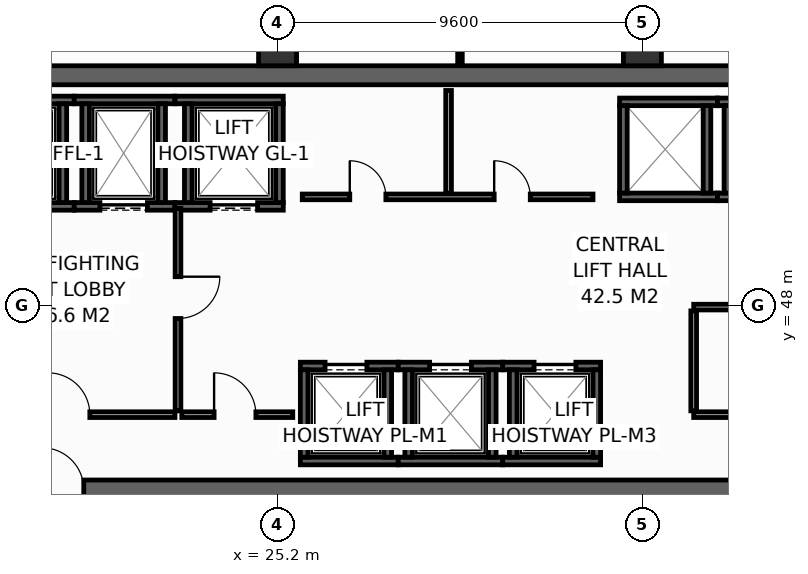
"""IFC4 building model, lengths in metres.
Left out: names, types, materials, properties, quantities, classifications, styles, units other than length and angle.
Written with IfcOpenShell. Run it as: python <this file> out.ifc"""

import sys

from ifc_helpers import new_model, si_unit, direction, frame, frame_2d, origin, origin_2d, place, context, subcontext, project, spatial, rectangle, hollow_rectangle, extrude, element, fill, save


model = new_model("IFC4")
c1 = context("Model", 3, precision=1e-05, world=origin(), true_north=direction((0.0, 1.0)))
c2 = subcontext(c1, "Body", "Model", "MODEL_VIEW")
j1 = project(units=[si_unit("LENGTHUNIT", "METRE"), si_unit("PLANEANGLEUNIT", "RADIAN")], contexts=[c1])
p1 = place(None, origin())
s1 = spatial("IfcSite", under=j1, at=p1, CompositionType="ELEMENT")
p2 = place(p1, origin())
s2 = spatial("IfcBuilding", under=s1, at=p2, CompositionType="ELEMENT")
p3 = place(p2, frame((0.0, 0.0, 137.2)))
s3 = spatial("IfcBuildingStorey", under=s2, at=p3, CompositionType="ELEMENT", Elevation=137.2)
p4 = place(p3, frame((13.6, 43.15, 0.0), z_axis=(0.0, 0.0, 1.0), x_axis=(1.0, 0.0, 0.0)))
e1 = element("IfcWall", 1, at=p4, inside=s3, PredefinedType="SHEAR", context=c2, shape_type="SweptSolid", body=[
    extrude(rectangle(XDim=32.7, YDim=0.5, at=frame_2d((16.35, 0.0))), origin(), (0.0, 0.0, 1.0), 3.55),
])
p5 = place(p4, frame((5.4, 0.0, 0.0)))
e2 = element("IfcOpeningElement", 2, at=p5, cuts=e1, PredefinedType="OPENING", context=c2, shape_type="SweptSolid", body=[
    extrude(rectangle(XDim=1.1, YDim=2.15, at=frame_2d((0.55, 1.075))), frame((0.0, 0.26, 0.0), z_axis=(0.0, -1.0, 0.0), x_axis=(1.0, 0.0, 0.0)), (0.0, 0.0, 1.0), 0.52),
])
p6 = place(p4, frame((25.6, 0.0, 0.0)))
e3 = element("IfcOpeningElement", 3, at=p6, cuts=e1, PredefinedType="OPENING", context=c2, shape_type="SweptSolid", body=[
    extrude(rectangle(XDim=1.1, YDim=2.15, at=frame_2d((0.55, 1.075))), frame((0.0, 0.26, 0.0), z_axis=(0.0, -1.0, 0.0), x_axis=(1.0, 0.0, 0.0)), (0.0, 0.0, 1.0), 0.52),
])
p7 = place(p3, frame((13.6, 54.05, 0.0), z_axis=(0.0, 0.0, 1.0), x_axis=(1.0, 0.0, 0.0)))
e4 = element("IfcWall", 4, at=p7, inside=s3, PredefinedType="SHEAR", context=c2, shape_type="SweptSolid", body=[
    extrude(rectangle(XDim=32.7, YDim=0.5, at=frame_2d((16.35, 0.0))), origin(), (0.0, 0.0, 1.0), 3.55),
])
for number, where, z_axis, x_axis in (
    (5, (25.2, 54.8, 0.0), (0.0, 0.0, 1.0), (1.0, 0.0, 0.0)),
    (6, (34.8, 54.8, 0.0), (0.0, 0.0, 1.0), (1.0, 0.0, 0.0)),
):
    element("IfcColumn", number, at=place(p3, frame(where, z_axis=z_axis, x_axis=x_axis)), inside=s3, PredefinedType="COLUMN", context=c2, shape_type="SweptSolid", body=[
        extrude(hollow_rectangle(XDim=1.0, YDim=1.0, WallThickness=0.045, at=origin_2d()), origin(), (0.0, 0.0, 1.0), 3.8),
    ])
p8 = place(p3, frame((17.33, 50.6, 0.0), z_axis=(0.0, 0.0, 1.0), x_axis=(1.0, 0.0, 0.0)))
e7 = element("IfcWall", 7, at=p8, inside=s3, PredefinedType="SHEAR", context=c2, shape_type="SweptSolid", body=[
    extrude(rectangle(XDim=2.52, YDim=0.2, at=frame_2d((1.26, 0.0))), origin(), (0.0, 0.0, 1.0), 3.55),
])
p9 = place(p8, frame((0.595, 0.0, 0.0)))
e8 = element("IfcOpeningElement", 8, at=p9, cuts=e7, PredefinedType="OPENING", context=c2, shape_type="SweptSolid", body=[
    extrude(rectangle(XDim=1.25, YDim=2.3, at=frame_2d((0.625, 1.15))), frame((0.0, 0.11, 0.0), z_axis=(0.0, -1.0, 0.0), x_axis=(1.0, 0.0, 0.0)), (0.0, 0.0, 1.0), 0.22),
])
p10 = place(p3, frame((17.33, 53.4, 0.0), z_axis=(0.0, 0.0, 1.0), x_axis=(1.0, 0.0, 0.0)))
e9 = element("IfcWall", 9, at=p10, inside=s3, PredefinedType="SHEAR", context=c2, shape_type="SweptSolid", body=[
    extrude(rectangle(XDim=2.52, YDim=0.2, at=frame_2d((1.26, 0.0))), origin(), (0.0, 0.0, 1.0), 3.55),
])
p11 = place(p3, frame((19.55, 50.7, 0.0), z_axis=(0.0, 0.0, 1.0), x_axis=(0.0, 1.0, 0.0)))
e10 = element("IfcWall", 10, at=p11, inside=s3, PredefinedType="SHEAR", context=c2, shape_type="SweptSolid", body=[
    extrude(rectangle(XDim=2.6, YDim=0.2, at=frame_2d((1.3, 0.0))), origin(), (0.0, 0.0, 1.0), 3.55),
])
p12 = place(p3, frame((19.85, 50.6, 0.0), z_axis=(0.0, 0.0, 1.0), x_axis=(1.0, 0.0, 0.0)))
e11 = element("IfcWall", 11, at=p12, inside=s3, PredefinedType="SHEAR", context=c2, shape_type="SweptSolid", body=[
    extrude(rectangle(XDim=2.65, YDim=0.2, at=frame_2d((1.325, 0.0))), origin(), (0.0, 0.0, 1.0), 3.55),
])
p13 = place(p12, frame((0.675, 0.0, 0.0)))
e12 = element("IfcOpeningElement", 12, at=p13, cuts=e11, PredefinedType="OPENING", context=c2, shape_type="SweptSolid", body=[
    extrude(rectangle(XDim=1.25, YDim=2.3, at=frame_2d((0.625, 1.15))), frame((0.0, 0.11, 0.0), z_axis=(0.0, -1.0, 0.0), x_axis=(1.0, 0.0, 0.0)), (0.0, 0.0, 1.0), 0.22),
])
p14 = place(p3, frame((19.85, 53.4, 0.0), z_axis=(0.0, 0.0, 1.0), x_axis=(1.0, 0.0, 0.0)))
e13 = element("IfcWall", 13, at=p14, inside=s3, PredefinedType="SHEAR", context=c2, shape_type="SweptSolid", body=[
    extrude(rectangle(XDim=2.65, YDim=0.2, at=frame_2d((1.325, 0.0))), origin(), (0.0, 0.0, 1.0), 3.55),
])
for number, where, z_axis, x_axis in (
    (14, (20.15, 50.7, 0.0), (0.0, 0.0, 1.0), (0.0, 1.0, 0.0)),
    (15, (22.15, 50.7, 0.0), (0.0, 0.0, 1.0), (0.0, 1.0, 0.0)),
):
    element("IfcWall", number, at=place(p3, frame(where, z_axis=z_axis, x_axis=x_axis)), inside=s3, PredefinedType="SHEAR", context=c2, shape_type="SweptSolid", body=[
        extrude(rectangle(XDim=2.6, YDim=0.2, at=frame_2d((1.3, 0.0))), origin(), (0.0, 0.0, 1.0), 3.55),
    ])
p15 = place(p3, frame((22.5, 50.6, 0.0), z_axis=(0.0, 0.0, 1.0), x_axis=(1.0, 0.0, 0.0)))
e16 = element("IfcWall", 16, at=p15, inside=s3, PredefinedType="SHEAR", context=c2, shape_type="SweptSolid", body=[
    extrude(rectangle(XDim=2.85, YDim=0.2, at=frame_2d((1.425, 0.0))), origin(), (0.0, 0.0, 1.0), 3.55),
])
p16 = place(p15, frame((0.925, 0.0, 0.0)))
e17 = element("IfcOpeningElement", 17, at=p16, cuts=e16, PredefinedType="OPENING", context=c2, shape_type="SweptSolid", body=[
    extrude(rectangle(XDim=1.25, YDim=2.3, at=frame_2d((0.625, 1.15))), frame((0.0, 0.11, 0.0), z_axis=(0.0, -1.0, 0.0), x_axis=(1.0, 0.0, 0.0)), (0.0, 0.0, 1.0), 0.22),
])
p17 = place(p3, frame((22.5, 53.4, 0.0), z_axis=(0.0, 0.0, 1.0), x_axis=(1.0, 0.0, 0.0)))
e18 = element("IfcWall", 18, at=p17, inside=s3, PredefinedType="SHEAR", context=c2, shape_type="SweptSolid", body=[
    extrude(rectangle(XDim=2.85, YDim=0.2, at=frame_2d((1.425, 0.0))), origin(), (0.0, 0.0, 1.0), 3.55),
])
for number, where, z_axis, x_axis in (
    (19, (22.85, 50.7, 0.0), (0.0, 0.0, 1.0), (0.0, 1.0, 0.0)),
    (20, (25.25, 50.7, 0.0), (0.0, 0.0, 1.0), (0.0, 1.0, 0.0)),
):
    element("IfcWall", number, at=place(p3, frame(where, z_axis=z_axis, x_axis=x_axis)), inside=s3, PredefinedType="SHEAR", context=c2, shape_type="SweptSolid", body=[
        extrude(rectangle(XDim=2.6, YDim=0.2, at=frame_2d((1.3, 0.0))), origin(), (0.0, 0.0, 1.0), 3.55),
    ])
p18 = place(p3, frame((25.8, 43.9, 0.0), z_axis=(0.0, 0.0, 1.0), x_axis=(1.0, 0.0, 0.0)))
e21 = element("IfcWall", 21, at=p18, inside=s3, PredefinedType="SHEAR", context=c2, shape_type="SweptSolid", body=[
    extrude(rectangle(XDim=2.575, YDim=0.2, at=frame_2d((1.288, 0.0))), origin(), (0.0, 0.0, 1.0), 3.55),
])
p19 = place(p3, frame((25.8, 46.4, 0.0), z_axis=(0.0, 0.0, 1.0), x_axis=(1.0, 0.0, 0.0)))
e22 = element("IfcWall", 22, at=p19, inside=s3, PredefinedType="SHEAR", context=c2, shape_type="SweptSolid", body=[
    extrude(rectangle(XDim=2.575, YDim=0.2, at=frame_2d((1.288, 0.0))), origin(), (0.0, 0.0, 1.0), 3.55),
])
p20 = place(p19, frame((0.65, 0.0, 0.0)))
e23 = element("IfcOpeningElement", 23, at=p20, cuts=e22, PredefinedType="OPENING", context=c2, shape_type="SweptSolid", body=[
    extrude(rectangle(XDim=1.1, YDim=2.2, at=frame_2d((0.55, 1.1))), frame((0.0, 0.11, 0.0), z_axis=(0.0, -1.0, 0.0), x_axis=(1.0, 0.0, 0.0)), (0.0, 0.0, 1.0), 0.22),
])
for number, where, z_axis, x_axis in (
    (24, (25.9, 44.0, 0.0), (0.0, 0.0, 1.0), (0.0, 1.0, 0.0)),
    (25, (28.1, 44.0, 0.0), (0.0, 0.0, 1.0), (0.0, 1.0, 0.0)),
):
    element("IfcWall", number, at=place(p3, frame(where, z_axis=z_axis, x_axis=x_axis)), inside=s3, PredefinedType="SHEAR", context=c2, shape_type="SweptSolid", body=[
        extrude(rectangle(XDim=2.3, YDim=0.2, at=frame_2d((1.15, 0.0))), origin(), (0.0, 0.0, 1.0), 3.55),
    ])
p21 = place(p3, frame((28.375, 43.9, 0.0), z_axis=(0.0, 0.0, 1.0), x_axis=(1.0, 0.0, 0.0)))
e26 = element("IfcWall", 26, at=p21, inside=s3, PredefinedType="SHEAR", context=c2, shape_type="SweptSolid", body=[
    extrude(rectangle(XDim=2.75, YDim=0.2, at=frame_2d((1.375, 0.0))), origin(), (0.0, 0.0, 1.0), 3.55),
])
p22 = place(p3, frame((28.375, 46.4, 0.0), z_axis=(0.0, 0.0, 1.0), x_axis=(1.0, 0.0, 0.0)))
e27 = element("IfcWall", 27, at=p22, inside=s3, PredefinedType="SHEAR", context=c2, shape_type="SweptSolid", body=[
    extrude(rectangle(XDim=2.75, YDim=0.2, at=frame_2d((1.375, 0.0))), origin(), (0.0, 0.0, 1.0), 3.55),
])
p23 = place(p22, frame((0.825, 0.0, 0.0)))
e28 = element("IfcOpeningElement", 28, at=p23, cuts=e27, PredefinedType="OPENING", context=c2, shape_type="SweptSolid", body=[
    extrude(rectangle(XDim=1.1, YDim=2.2, at=frame_2d((0.55, 1.1))), frame((0.0, 0.11, 0.0), z_axis=(0.0, -1.0, 0.0), x_axis=(1.0, 0.0, 0.0)), (0.0, 0.0, 1.0), 0.22),
])
for number, where, z_axis, x_axis in (
    (29, (28.65, 44.0, 0.0), (0.0, 0.0, 1.0), (0.0, 1.0, 0.0)),
    (30, (30.85, 44.0, 0.0), (0.0, 0.0, 1.0), (0.0, 1.0, 0.0)),
):
    element("IfcWall", number, at=place(p3, frame(where, z_axis=z_axis, x_axis=x_axis)), inside=s3, PredefinedType="SHEAR", context=c2, shape_type="SweptSolid", body=[
        extrude(rectangle(XDim=2.3, YDim=0.2, at=frame_2d((1.15, 0.0))), origin(), (0.0, 0.0, 1.0), 3.55),
    ])
p24 = place(p3, frame((31.125, 43.9, 0.0), z_axis=(0.0, 0.0, 1.0), x_axis=(1.0, 0.0, 0.0)))
e31 = element("IfcWall", 31, at=p24, inside=s3, PredefinedType="SHEAR", context=c2, shape_type="SweptSolid", body=[
    extrude(rectangle(XDim=2.575, YDim=0.2, at=frame_2d((1.288, 0.0))), origin(), (0.0, 0.0, 1.0), 3.55),
])
p25 = place(p3, frame((31.125, 46.4, 0.0), z_axis=(0.0, 0.0, 1.0), x_axis=(1.0, 0.0, 0.0)))
e32 = element("IfcWall", 32, at=p25, inside=s3, PredefinedType="SHEAR", context=c2, shape_type="SweptSolid", body=[
    extrude(rectangle(XDim=2.575, YDim=0.2, at=frame_2d((1.288, 0.0))), origin(), (0.0, 0.0, 1.0), 3.55),
])
p26 = place(p25, frame((0.825, 0.0, 0.0)))
e33 = element("IfcOpeningElement", 33, at=p26, cuts=e32, PredefinedType="OPENING", context=c2, shape_type="SweptSolid", body=[
    extrude(rectangle(XDim=1.1, YDim=2.2, at=frame_2d((0.55, 1.1))), frame((0.0, 0.11, 0.0), z_axis=(0.0, -1.0, 0.0), x_axis=(1.0, 0.0, 0.0)), (0.0, 0.0, 1.0), 0.22),
])
for number, where, z_axis, x_axis in (
    (34, (31.4, 44.0, 0.0), (0.0, 0.0, 1.0), (0.0, 1.0, 0.0)),
    (35, (33.6, 44.0, 0.0), (0.0, 0.0, 1.0), (0.0, 1.0, 0.0)),
):
    element("IfcWall", number, at=place(p3, frame(where, z_axis=z_axis, x_axis=x_axis)), inside=s3, PredefinedType="SHEAR", context=c2, shape_type="SweptSolid", body=[
        extrude(rectangle(XDim=2.3, YDim=0.2, at=frame_2d((1.15, 0.0))), origin(), (0.0, 0.0, 1.0), 3.55),
    ])
for number, where, z_axis, x_axis in (
    (36, (34.2, 50.85, 0.0), (0.0, 0.0, 1.0), (1.0, 0.0, 0.0)),
    (37, (34.2, 53.35, 0.0), (0.0, 0.0, 1.0), (1.0, 0.0, 0.0)),
):
    element("IfcWall", number, at=place(p3, frame(where, z_axis=z_axis, x_axis=x_axis)), inside=s3, PredefinedType="SHEAR", context=c2, shape_type="SweptSolid", body=[
        extrude(rectangle(XDim=2.575, YDim=0.2, at=frame_2d((1.288, 0.0))), origin(), (0.0, 0.0, 1.0), 3.55),
    ])
for number, where, z_axis, x_axis in (
    (38, (34.3, 50.95, 0.0), (0.0, 0.0, 1.0), (0.0, 1.0, 0.0)),
    (39, (36.5, 50.95, 0.0), (0.0, 0.0, 1.0), (0.0, 1.0, 0.0)),
):
    element("IfcWall", number, at=place(p3, frame(where, z_axis=z_axis, x_axis=x_axis)), inside=s3, PredefinedType="SHEAR", context=c2, shape_type="SweptSolid", body=[
        extrude(rectangle(XDim=2.3, YDim=0.2, at=frame_2d((1.15, 0.0))), origin(), (0.0, 0.0, 1.0), 3.55),
    ])
for number, where, z_axis, x_axis in (
    (40, (36.775, 50.85, 0.0), (0.0, 0.0, 1.0), (1.0, 0.0, 0.0)),
    (41, (36.775, 53.35, 0.0), (0.0, 0.0, 1.0), (1.0, 0.0, 0.0)),
):
    element("IfcWall", number, at=place(p3, frame(where, z_axis=z_axis, x_axis=x_axis)), inside=s3, PredefinedType="SHEAR", context=c2, shape_type="SweptSolid", body=[
        extrude(rectangle(XDim=2.75, YDim=0.2, at=frame_2d((1.375, 0.0))), origin(), (0.0, 0.0, 1.0), 3.55),
    ])
p27 = place(p3, frame((37.05, 50.95, 0.0), z_axis=(0.0, 0.0, 1.0), x_axis=(0.0, 1.0, 0.0)))
e42 = element("IfcWall", 42, at=p27, inside=s3, PredefinedType="SHEAR", context=c2, shape_type="SweptSolid", body=[
    extrude(rectangle(XDim=2.3, YDim=0.2, at=frame_2d((1.15, 0.0))), origin(), (0.0, 0.0, 1.0), 3.55),
])
p28 = place(p3, frame((17.36, 45.12, 0.0), z_axis=(0.0, 0.0, 1.0), x_axis=(1.0, 0.0, 0.0)))
e43 = element("IfcWall", 43, at=p28, inside=s3, PredefinedType="PARTITIONING", context=c2, shape_type="SweptSolid", body=[
    extrude(rectangle(XDim=5.14, YDim=0.15, at=frame_2d((2.57, 0.0))), origin(), (0.0, 0.0, 1.0), 3.55),
])
p29 = place(p28, frame((1.8, 0.0, 0.0)))
e44 = element("IfcOpeningElement", 44, at=p29, cuts=e43, PredefinedType="OPENING", context=c2, shape_type="SweptSolid", body=[
    extrude(rectangle(XDim=1.1, YDim=2.15, at=frame_2d((0.55, 1.075))), frame((0.0, 0.085, 0.0), z_axis=(0.0, -1.0, 0.0), x_axis=(1.0, 0.0, 0.0)), (0.0, 0.0, 1.0), 0.17),
])
p30 = place(p3, frame((22.58, 50.55, 0.0), z_axis=(0.0, 0.0, 1.0), x_axis=(0.0, -1.0, 0.0)))
e45 = element("IfcWall", 45, at=p30, inside=s3, PredefinedType="PARTITIONING", context=c2, shape_type="SweptSolid", body=[
    extrude(rectangle(XDim=5.33, YDim=0.15, at=frame_2d((2.665, 0.0))), origin(), (0.0, 0.0, 1.0), 3.55),
])
p31 = place(p30, frame((1.8, 0.0, 0.0)))
e46 = element("IfcOpeningElement", 46, at=p31, cuts=e45, PredefinedType="OPENING", context=c2, shape_type="SweptSolid", body=[
    extrude(rectangle(XDim=1.1, YDim=2.15, at=frame_2d((0.55, 1.075))), frame((0.0, 0.085, 0.0), z_axis=(0.0, -1.0, 0.0), x_axis=(1.0, 0.0, 0.0)), (0.0, 0.0, 1.0), 0.17),
])
p32 = place(p3, frame((22.68, 45.12, 0.0), z_axis=(0.0, 0.0, 1.0), x_axis=(1.0, 0.0, 0.0)))
e47 = element("IfcWall", 47, at=p32, inside=s3, PredefinedType="PARTITIONING", context=c2, shape_type="SweptSolid", body=[
    extrude(rectangle(XDim=2.92, YDim=0.15, at=frame_2d((1.46, 0.0))), origin(), (0.0, 0.0, 1.0), 3.55),
])
p33 = place(p32, frame((0.85, 0.0, 0.0)))
e48 = element("IfcOpeningElement", 48, at=p33, cuts=e47, PredefinedType="OPENING", context=c2, shape_type="SweptSolid", body=[
    extrude(rectangle(XDim=1.1, YDim=2.15, at=frame_2d((0.55, 1.075))), frame((0.0, 0.085, 0.0), z_axis=(0.0, -1.0, 0.0), x_axis=(1.0, 0.0, 0.0)), (0.0, 0.0, 1.0), 0.17),
])
p34 = place(p3, frame((36.15, 45.12, 0.0), z_axis=(0.0, 0.0, 1.0), x_axis=(1.0, 0.0, 0.0)))
e49 = element("IfcWall", 49, at=p34, inside=s3, PredefinedType="PARTITIONING", context=c2, shape_type="SweptSolid", body=[
    extrude(rectangle(XDim=6.35, YDim=0.15, at=frame_2d((3.175, 0.0))), origin(), (0.0, 0.0, 1.0), 3.55),
])
p35 = place(p34, frame((1.05, 0.0, 0.0)))
e50 = element("IfcOpeningElement", 50, at=p35, cuts=e49, PredefinedType="OPENING", context=c2, shape_type="SweptSolid", body=[
    extrude(rectangle(XDim=0.95, YDim=2.15, at=frame_2d((0.475, 1.075))), frame((0.0, 0.085, 0.0), z_axis=(0.0, -1.0, 0.0), x_axis=(1.0, 0.0, 0.0)), (0.0, 0.0, 1.0), 0.17),
])
p36 = place(p34, frame((4.25, 0.0, 0.0)))
e51 = element("IfcOpeningElement", 51, at=p36, cuts=e49, PredefinedType="OPENING", context=c2, shape_type="SweptSolid", body=[
    extrude(rectangle(XDim=0.95, YDim=2.15, at=frame_2d((0.475, 1.075))), frame((0.0, 0.085, 0.0), z_axis=(0.0, -1.0, 0.0), x_axis=(1.0, 0.0, 0.0)), (0.0, 0.0, 1.0), 0.17),
])
p37 = place(p3, frame((36.15, 47.95, 0.0), z_axis=(0.0, 0.0, 1.0), x_axis=(1.0, 0.0, 0.0)))
e52 = element("IfcWall", 52, at=p37, inside=s3, PredefinedType="PARTITIONING", context=c2, shape_type="SweptSolid", body=[
    extrude(rectangle(XDim=6.35, YDim=0.15, at=frame_2d((3.175, 0.0))), origin(), (0.0, 0.0, 1.0), 3.55),
])
p38 = place(p3, frame((36.15, 45.22, 0.0), z_axis=(0.0, 0.0, 1.0), x_axis=(0.0, 1.0, 0.0)))
e53 = element("IfcWall", 53, at=p38, inside=s3, PredefinedType="PARTITIONING", context=c2, shape_type="SweptSolid", body=[
    extrude(rectangle(XDim=2.63, YDim=0.15, at=frame_2d((1.315, 0.0))), origin(), (0.0, 0.0, 1.0), 3.55),
])
p39 = place(p3, frame((25.85, 50.85, 0.0), z_axis=(0.0, 0.0, 1.0), x_axis=(1.0, 0.0, 0.0)))
e54 = element("IfcWall", 54, at=p39, inside=s3, PredefinedType="PARTITIONING", context=c2, shape_type="SweptSolid", body=[
    extrude(rectangle(XDim=7.65, YDim=0.15, at=frame_2d((3.825, 0.0))), origin(), (0.0, 0.0, 1.0), 3.55),
])
p40 = place(p39, frame((1.25, 0.0, 0.0)))
e55 = element("IfcOpeningElement", 55, at=p40, cuts=e54, PredefinedType="OPENING", context=c2, shape_type="SweptSolid", body=[
    extrude(rectangle(XDim=0.95, YDim=2.15, at=frame_2d((0.475, 1.075))), frame((0.0, 0.085, 0.0), z_axis=(0.0, -1.0, 0.0), x_axis=(1.0, 0.0, 0.0)), (0.0, 0.0, 1.0), 0.17),
])
p41 = place(p39, frame((5.05, 0.0, 0.0)))
e56 = element("IfcOpeningElement", 56, at=p41, cuts=e54, PredefinedType="OPENING", context=c2, shape_type="SweptSolid", body=[
    extrude(rectangle(XDim=0.95, YDim=2.15, at=frame_2d((0.475, 1.075))), frame((0.0, 0.085, 0.0), z_axis=(0.0, -1.0, 0.0), x_axis=(1.0, 0.0, 0.0)), (0.0, 0.0, 1.0), 0.17),
])
p42 = place(p3, frame((29.7, 50.95, 0.0), z_axis=(0.0, 0.0, 1.0), x_axis=(0.0, 1.0, 0.0)))
e57 = element("IfcWall", 57, at=p42, inside=s3, PredefinedType="PARTITIONING", context=c2, shape_type="SweptSolid", body=[
    extrude(rectangle(XDim=2.7, YDim=0.15, at=frame_2d((1.35, 0.0))), origin(), (0.0, 0.0, 1.0), 3.55),
])
p43 = place(p3, frame((30.0, 54.32, 0.0), z_axis=(0.0, 0.0, 1.0), x_axis=(0.0, 1.0, 0.0)))
e58 = element("IfcWall", 58, at=p43, inside=s3, PredefinedType="PARTITIONING", context=c2, shape_type="SweptSolid", body=[
    extrude(rectangle(XDim=1.675, YDim=0.12, at=frame_2d((0.837, 0.0))), origin(), (0.0, 0.0, 1.0), 2.935),
])
p44 = place(p13, origin())
e59 = element("IfcDoor", 59, at=p44, inside=s3, OperationType="SLIDING_TO_LEFT", PredefinedType="DOOR", context=c2, shape_type="SweptSolid", body=[
    extrude(rectangle(XDim=1.25, YDim=2.3, at=frame_2d((0.625, 1.15))), frame((0.0, 0.025, 0.0), z_axis=(0.0, -1.0, 0.0), x_axis=(1.0, 0.0, 0.0)), (0.0, 0.0, 1.0), 0.05),
])
fill(e12, e59)
p45 = place(p16, origin())
e60 = element("IfcDoor", 60, at=p45, inside=s3, OperationType="SLIDING_TO_LEFT", PredefinedType="DOOR", context=c2, shape_type="SweptSolid", body=[
    extrude(rectangle(XDim=1.25, YDim=2.3, at=frame_2d((0.625, 1.15))), frame((0.0, 0.025, 0.0), z_axis=(0.0, -1.0, 0.0), x_axis=(1.0, 0.0, 0.0)), (0.0, 0.0, 1.0), 0.05),
])
fill(e17, e60)
p46 = place(p20, origin())
e61 = element("IfcDoor", 61, at=p46, inside=s3, OperationType="SLIDING_TO_LEFT", PredefinedType="DOOR", context=c2, shape_type="SweptSolid", body=[
    extrude(rectangle(XDim=1.1, YDim=2.2, at=frame_2d((0.55, 1.1))), frame((0.0, 0.025, 0.0), z_axis=(0.0, -1.0, 0.0), x_axis=(1.0, 0.0, 0.0)), (0.0, 0.0, 1.0), 0.05),
])
fill(e23, e61)
p47 = place(p23, origin())
e62 = element("IfcDoor", 62, at=p47, inside=s3, OperationType="SLIDING_TO_LEFT", PredefinedType="DOOR", context=c2, shape_type="SweptSolid", body=[
    extrude(rectangle(XDim=1.1, YDim=2.2, at=frame_2d((0.55, 1.1))), frame((0.0, 0.025, 0.0), z_axis=(0.0, -1.0, 0.0), x_axis=(1.0, 0.0, 0.0)), (0.0, 0.0, 1.0), 0.05),
])
fill(e28, e62)
p48 = place(p26, origin())
e63 = element("IfcDoor", 63, at=p48, inside=s3, OperationType="SLIDING_TO_LEFT", PredefinedType="DOOR", context=c2, shape_type="SweptSolid", body=[
    extrude(rectangle(XDim=1.1, YDim=2.2, at=frame_2d((0.55, 1.1))), frame((0.0, 0.025, 0.0), z_axis=(0.0, -1.0, 0.0), x_axis=(1.0, 0.0, 0.0)), (0.0, 0.0, 1.0), 0.05),
])
fill(e33, e63)
p49 = place(p29, origin())
e64 = element("IfcDoor", 64, at=p49, inside=s3, OperationType="SINGLE_SWING_LEFT", PredefinedType="DOOR", context=c2, shape_type="SweptSolid", body=[
    extrude(rectangle(XDim=1.1, YDim=2.15, at=frame_2d((0.55, 1.075))), frame((0.0, 0.025, 0.0), z_axis=(0.0, -1.0, 0.0), x_axis=(1.0, 0.0, 0.0)), (0.0, 0.0, 1.0), 0.05),
])
fill(e44, e64)
p50 = place(p31, origin())
e65 = element("IfcDoor", 65, at=p50, inside=s3, OperationType="SINGLE_SWING_LEFT", PredefinedType="DOOR", context=c2, shape_type="SweptSolid", body=[
    extrude(rectangle(XDim=1.1, YDim=2.15, at=frame_2d((0.55, 1.075))), frame((0.0, 0.025, 0.0), z_axis=(0.0, -1.0, 0.0), x_axis=(1.0, 0.0, 0.0)), (0.0, 0.0, 1.0), 0.05),
])
fill(e46, e65)
p51 = place(p33, origin())
e66 = element("IfcDoor", 66, at=p51, inside=s3, OperationType="SINGLE_SWING_LEFT", PredefinedType="DOOR", context=c2, shape_type="SweptSolid", body=[
    extrude(rectangle(XDim=1.1, YDim=2.15, at=frame_2d((0.55, 1.075))), frame((0.0, 0.025, 0.0), z_axis=(0.0, -1.0, 0.0), x_axis=(1.0, 0.0, 0.0)), (0.0, 0.0, 1.0), 0.05),
])
fill(e48, e66)
p52 = place(p5, origin())
e67 = element("IfcDoor", 67, at=p52, inside=s3, OperationType="SINGLE_SWING_LEFT", PredefinedType="DOOR", context=c2, shape_type="SweptSolid", body=[
    extrude(rectangle(XDim=1.1, YDim=2.15, at=frame_2d((0.55, 1.075))), frame((0.0, 0.025, 0.0), z_axis=(0.0, -1.0, 0.0), x_axis=(1.0, 0.0, 0.0)), (0.0, 0.0, 1.0), 0.05),
])
fill(e2, e67)
p53 = place(p40, origin())
e68 = element("IfcDoor", 68, at=p53, inside=s3, OperationType="SINGLE_SWING_LEFT", PredefinedType="DOOR", context=c2, shape_type="SweptSolid", body=[
    extrude(rectangle(XDim=0.95, YDim=2.15, at=frame_2d((0.475, 1.075))), frame((0.0, 0.025, 0.0), z_axis=(0.0, -1.0, 0.0), x_axis=(1.0, 0.0, 0.0)), (0.0, 0.0, 1.0), 0.05),
])
fill(e55, e68)
p54 = place(p41, origin())
e69 = element("IfcDoor", 69, at=p54, inside=s3, OperationType="SINGLE_SWING_LEFT", PredefinedType="DOOR", context=c2, shape_type="SweptSolid", body=[
    extrude(rectangle(XDim=0.95, YDim=2.15, at=frame_2d((0.475, 1.075))), frame((0.0, 0.025, 0.0), z_axis=(0.0, -1.0, 0.0), x_axis=(1.0, 0.0, 0.0)), (0.0, 0.0, 1.0), 0.05),
])
fill(e56, e69)
save(model, sys.argv[1])
